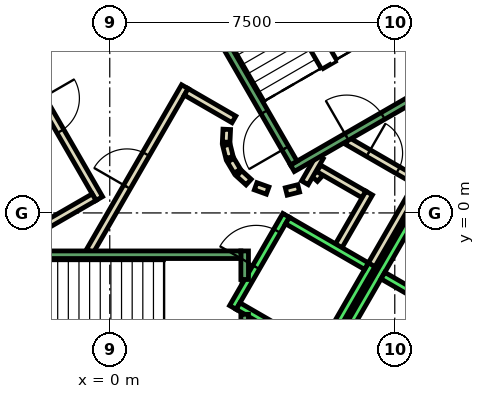
"""IFC4 building model, lengths in metres.
Left out: names, types, materials, properties, quantities, classifications, styles, units other than length and angle.
Written with IfcOpenShell. Run it as: python <this file> out.ifc"""

import sys

from ifc_helpers import new_model, si_unit, direction, frame, frame_2d, origin, place, context, subcontext, project, spatial, rectangle, extrude, element, fill, save


model = new_model("IFC4")
c1 = context("Model", 3, precision=1e-05, world=origin(), true_north=direction((0.0, 1.0)))
c2 = subcontext(c1, "Body", "Model", "MODEL_VIEW")
j1 = project(units=[si_unit("LENGTHUNIT", "METRE"), si_unit("PLANEANGLEUNIT", "RADIAN")], contexts=[c1])
p1 = place(None, origin())
s1 = spatial("IfcSite", under=j1, at=p1, CompositionType="ELEMENT")
p2 = place(p1, origin())
s2 = spatial("IfcBuilding", under=s1, at=p2, CompositionType="ELEMENT")
p3 = place(p2, frame((0.0, 0.0, 159.2)))
s3 = spatial("IfcBuildingStorey", under=s2, at=p3, CompositionType="ELEMENT", Elevation=159.2)
p4 = place(p3, frame((5.39, 0.898, 0.0), z_axis=(0.0, 0.0, 1.0), x_axis=(0.673828488714, 0.738887791073, 0.0)))
e1 = element("IfcWall", 1, at=p4, inside=s3, PredefinedType="PARTITIONING", context=c2, shape_type="SweptSolid", body=[
    extrude(rectangle(XDim=0.263, YDim=0.2, at=frame_2d((0.131, 0.0))), origin(), (0.0, 0.0, 1.0), 3.8),
])
p5 = place(p3, frame((5.499, 1.172, 0.0), z_axis=(0.0, 0.0, 1.0), x_axis=(0.866333505267, -0.499465972466, 0.0)))
e2 = element("IfcWall", 2, at=p5, inside=s3, PredefinedType="PARTITIONING", context=c2, shape_type="SweptSolid", body=[
    extrude(rectangle(XDim=1.374, YDim=0.2, at=frame_2d((0.687, 0.0))), origin(), (0.0, 0.0, 1.0), 3.8),
])
p6 = place(p3, frame((6.826, 0.522, 0.0), z_axis=(0.0, 0.0, 1.0), x_axis=(-0.500016722714, -0.866015748706, 0.0)))
e3 = element("IfcWall", 3, at=p6, inside=s3, PredefinedType="PARTITIONING", context=c2, shape_type="SweptSolid", body=[
    extrude(rectangle(XDim=1.7, YDim=0.2, at=frame_2d((0.85, 0.0))), origin(), (0.0, 0.0, 1.0), 3.8),
])
p7 = place(p3, frame((6.25, 1.894, 0.0), z_axis=(0.0, 0.0, 1.0), x_axis=(0.866043184279, -0.499969202016, 0.0)))
e4 = element("IfcWall", 4, at=p7, inside=s3, PredefinedType="PARTITIONING", context=c2, shape_type="SweptSolid", body=[
    extrude(rectangle(XDim=2.084, YDim=0.2, at=frame_2d((1.042, 0.0))), origin(), (0.0, 0.0, 1.0), 3.8),
])
p8 = place(p7, frame((0.642, 0.0, 0.0)))
e5 = element("IfcOpeningElement", 5, at=p8, cuts=e4, PredefinedType="OPENING", context=c2, shape_type="SweptSolid", body=[
    extrude(rectangle(XDim=0.9, YDim=2.1, at=frame_2d((0.45, 1.05))), frame((0.0, 0.11, 0.0), z_axis=(0.0, -1.0, 0.0), x_axis=(1.0, 0.0, 0.0)), (0.0, 0.0, 1.0), 0.22),
])
p9 = place(p3, frame((8.192, 0.888, 0.0), z_axis=(0.0, 0.0, 1.0), x_axis=(-0.499940625693, -0.866059680843, 0.0)))
e6 = element("IfcWall", 6, at=p9, inside=s3, PredefinedType="PARTITIONING", context=c2, shape_type="SweptSolid", body=[
    extrude(rectangle(XDim=2.68, YDim=0.2, at=frame_2d((1.34, 0.0))), origin(), (0.0, 0.0, 1.0), 3.8),
])
p10 = place(p3, frame((5.135, 0.793, 0.0), z_axis=(0.0, 0.0, 1.0), x_axis=(0.499526442893, 0.866298639529, 0.0)))
e7 = element("IfcWall", 7, at=p10, inside=s3, PredefinedType="PARTITIONING", context=c2, shape_type="SweptSolid", body=[
    extrude(rectangle(XDim=0.791, YDim=0.2, at=frame_2d((0.396, 0.0))), origin(), (0.0, 0.0, 1.0), 3.8),
])
p11 = place(p3, frame((-0.52, -1.0, 0.0), z_axis=(0.0, 0.0, 1.0), x_axis=(0.50011622646, 0.865958290007, 0.0)))
e8 = element("IfcWall", 8, at=p11, inside=s3, PredefinedType="PARTITIONING", context=c2, shape_type="SweptSolid", body=[
    extrude(rectangle(XDim=4.991, YDim=0.2, at=frame_2d((2.496, 0.0))), origin(), (0.0, 0.0, 1.0), 3.8),
])
p12 = place(p11, frame((1.945, 0.0, 0.0)))
e9 = element("IfcOpeningElement", 9, at=p12, cuts=e8, PredefinedType="OPENING", context=c2, shape_type="SweptSolid", body=[
    extrude(rectangle(XDim=1.0, YDim=2.1, at=frame_2d((0.5, 1.05))), frame((0.0, 0.11, 0.0), z_axis=(0.0, -1.0, 0.0), x_axis=(1.0, 0.0, 0.0)), (0.0, 0.0, 1.0), 0.22),
])
p13 = place(p3, frame((2.012, 3.186, 0.0), z_axis=(0.0, 0.0, 1.0), x_axis=(0.865891012941, -0.500232699559, 0.0)))
e10 = element("IfcWall", 10, at=p13, inside=s3, PredefinedType="PARTITIONING", context=c2, shape_type="SweptSolid", body=[
    extrude(rectangle(XDim=1.449, YDim=0.2, at=frame_2d((0.725, 0.0))), origin(), (0.0, 0.0, 1.0), 3.8),
])
p14 = place(p3, frame((3.079, 2.199, 0.0), z_axis=(0.0, 0.0, 1.0), x_axis=(-0.047771483479, -0.998858290933, 0.0)))
e11 = element("IfcWall", 11, at=p14, inside=s3, PredefinedType="PARTITIONING", context=c2, shape_type="SweptSolid", body=[
    extrude(rectangle(XDim=0.337, YDim=0.2, at=frame_2d((0.169, 0.0))), origin(), (0.0, 0.0, 1.0), 3.8),
])
p15 = place(p3, frame((3.07, 1.786, 0.0), z_axis=(0.0, 0.0, 1.0), x_axis=(0.242705583207, -0.970099994784, 0.0)))
e12 = element("IfcWall", 12, at=p15, inside=s3, PredefinedType="PARTITIONING", context=c2, shape_type="SweptSolid", body=[
    extrude(rectangle(XDim=0.338, YDim=0.2, at=frame_2d((0.169, 0.0))), origin(), (0.0, 0.0, 1.0), 3.8),
])
for number, where, z_axis, x_axis in (
    (13, (3.182, 1.388, 0.0), (0.0, 0.0, 1.0), (0.512, -0.859, 0.0)),
    (14, (3.404, 1.039, 0.0), (0.0, 0.0, 1.0), (0.74, -0.672, 0.0)),
):
    element("IfcWall", number, at=place(p3, frame(where, z_axis=z_axis, x_axis=x_axis)), inside=s3, PredefinedType="PARTITIONING", context=c2, shape_type="SweptSolid", body=[
        extrude(rectangle(XDim=0.338, YDim=0.2, at=frame_2d((0.169, 0.0))), origin(), (0.0, 0.0, 1.0), 3.8),
    ])
p16 = place(p3, frame((3.838, 0.702, 0.0), z_axis=(0.0, 0.0, 1.0), x_axis=(0.941035081519, -0.338308993895, 0.0)))
e15 = element("IfcWall", 15, at=p16, inside=s3, PredefinedType="PARTITIONING", context=c2, shape_type="SweptSolid", body=[
    extrude(rectangle(XDim=0.337, YDim=0.2, at=frame_2d((0.168, 0.0))), origin(), (0.0, 0.0, 1.0), 3.8),
])
p17 = place(p3, frame((4.644, 0.564, 0.0), z_axis=(0.0, 0.0, 1.0), x_axis=(0.969929076366, 0.243387729394, 0.0)))
e16 = element("IfcWall", 16, at=p17, inside=s3, PredefinedType="PARTITIONING", context=c2, shape_type="SweptSolid", body=[
    extrude(rectangle(XDim=0.337, YDim=0.2, at=frame_2d((0.168, 0.0))), origin(), (0.0, 0.0, 1.0), 3.8),
])
p18 = place(p3, frame((-2.771, 4.7, 0.0), z_axis=(0.0, 0.0, 1.0), x_axis=(0.499969479948, -0.866043023828, 0.0)))
e17 = element("IfcWall", 17, at=p18, inside=s3, PredefinedType="PARTITIONING", context=c2, shape_type="SweptSolid", body=[
    extrude(rectangle(XDim=4.99, YDim=0.2, at=frame_2d((2.495, 0.0))), origin(), (0.0, 0.0, 1.0), 3.8),
])
p19 = place(p18, frame((1.945, 0.0, 0.0)))
e18 = element("IfcOpeningElement", 18, at=p19, cuts=e17, PredefinedType="OPENING", context=c2, shape_type="SweptSolid", body=[
    extrude(rectangle(XDim=1.0, YDim=2.1, at=frame_2d((0.5, 1.05))), frame((0.0, 0.11, 0.0), z_axis=(0.0, -1.0, 0.0), x_axis=(1.0, 0.0, 0.0)), (0.0, 0.0, 1.0), 0.22),
])
p20 = place(p3, frame((-0.412, 0.414, 0.0), z_axis=(0.0, 0.0, 1.0), x_axis=(-0.866017369001, -0.500013916395, 0.0)))
e19 = element("IfcWall", 19, at=p20, inside=s3, PredefinedType="PARTITIONING", context=c2, shape_type="SweptSolid", body=[
    extrude(rectangle(XDim=1.45, YDim=0.2, at=frame_2d((0.725, 0.0))), origin(), (0.0, 0.0, 1.0), 3.8),
])
p21 = place(p3, frame((3.24, -2.488, 0.0), z_axis=(0.0, 0.0, 1.0), x_axis=(0.49994636267, 0.866056369097, 0.0)))
e20 = element("IfcWall", 20, at=p21, inside=s3, PredefinedType="STANDARD", context=c2, shape_type="SweptSolid", body=[
    extrude(rectangle(XDim=2.8, YDim=0.2, at=frame_2d((1.4, 0.0))), origin(), (0.0, 0.0, 1.0), 3.8),
])
p22 = place(p21, frame((1.225, 0.0, 0.0)))
e21 = element("IfcOpeningElement", 21, at=p22, cuts=e20, PredefinedType="OPENING", context=c2, shape_type="SweptSolid", body=[
    extrude(rectangle(XDim=1.1, YDim=2.1, at=frame_2d((0.55, 1.05))), frame((0.0, 0.11, 0.0), z_axis=(0.0, -1.0, 0.0), x_axis=(1.0, 0.0, 0.0)), (0.0, 0.0, 1.0), 0.22),
])
p23 = place(p3, frame((5.492, -3.788, 0.0), z_axis=(0.0, 0.0, 1.0), x_axis=(0.500011755427, 0.866018616679, 0.0)))
e22 = element("IfcWall", 22, at=p23, inside=s3, PredefinedType="STANDARD", context=c2, shape_type="SweptSolid", body=[
    extrude(rectangle(XDim=2.8, YDim=0.2, at=frame_2d((1.4, 0.0))), origin(), (0.0, 0.0, 1.0), 3.8),
])
p24 = place(p3, frame((3.377, -2.452, 0.0), z_axis=(0.0, 0.0, 1.0), x_axis=(0.865955154139, -0.50012165622, 0.0)))
e23 = element("IfcWall", 23, at=p24, inside=s3, PredefinedType="STANDARD", context=c2, shape_type="SweptSolid", body=[
    extrude(rectangle(XDim=2.4, YDim=0.2, at=frame_2d((1.2, 0.0))), origin(), (0.0, 0.0, 1.0), 3.8),
])
p25 = place(p3, frame((4.677, -0.2, 0.0), z_axis=(0.0, 0.0, 1.0), x_axis=(0.865973769406, -0.500089422704, 0.0)))
e24 = element("IfcWall", 24, at=p25, inside=s3, PredefinedType="STANDARD", context=c2, shape_type="SweptSolid", body=[
    extrude(rectangle(XDim=2.399, YDim=0.2, at=frame_2d((1.2, 0.0))), origin(), (0.0, 0.0, 1.0), 3.8),
])
p26 = place(p3, frame((4.451, -6.19, 0.0), z_axis=(0.0, 0.0, 1.0), x_axis=(0.50000090737, 0.866024879913, 0.0)))
e25 = element("IfcWall", 25, at=p26, inside=s3, PredefinedType="STANDARD", context=c2, shape_type="SweptSolid", body=[
    extrude(rectangle(XDim=10.6, YDim=0.2, at=frame_2d((5.3, 0.0))), origin(), (0.0, 0.0, 1.0), 3.8),
])
p27 = place(p3, frame((7.188, -1.65, 0.0), z_axis=(0.0, 0.0, 1.0), x_axis=(0.866022959057, -0.500004234368, 0.0)))
e26 = element("IfcWall", 26, at=p27, inside=s3, PredefinedType="STANDARD", context=c2, shape_type="SweptSolid", body=[
    extrude(rectangle(XDim=2.5, YDim=0.2, at=frame_2d((1.25, 0.0))), origin(), (0.0, 0.0, 1.0), 3.8),
])
p28 = place(p3, frame((3.55, -2.667, 0.0), z_axis=(0.0, 0.0, 1.0), x_axis=(0.0, -1.0, 0.0)))
e27 = element("IfcWall", 27, at=p28, inside=s3, PredefinedType="STANDARD", context=c2, shape_type="SweptSolid", body=[
    extrude(rectangle(XDim=2.733, YDim=0.2, at=frame_2d((1.366, 0.0))), origin(), (0.0, 0.0, 1.0), 3.8),
])
p29 = place(p3, frame((3.55, -1.0, 0.0), z_axis=(0.0, 0.0, 1.0), x_axis=(0.0, -1.0, 0.0)))
e28 = element("IfcWall", 28, at=p29, inside=s3, PredefinedType="STANDARD", context=c2, shape_type="SweptSolid", body=[
    extrude(rectangle(XDim=0.751, YDim=0.2, at=frame_2d((0.375, 0.0))), origin(), (0.0, 0.0, 1.0), 3.8),
])
p30 = place(p3, frame((-3.45, -1.1, 0.0), z_axis=(0.0, 0.0, 1.0), x_axis=(1.0, 0.0, 0.0)))
e29 = element("IfcWall", 29, at=p30, inside=s3, PredefinedType="STANDARD", context=c2, shape_type="SweptSolid", body=[
    extrude(rectangle(XDim=6.9, YDim=0.2, at=frame_2d((3.45, 0.0))), origin(), (0.0, 0.0, 1.0), 3.8),
])
p31 = place(p30, frame((0.45, 0.0, 0.0)))
e30 = element("IfcOpeningElement", 30, at=p31, cuts=e29, PredefinedType="OPENING", context=c2, shape_type="SweptSolid", body=[
    extrude(rectangle(XDim=1.1, YDim=2.2, at=frame_2d((0.55, 1.1))), frame((0.0, 0.11, 0.0), z_axis=(0.0, -1.0, 0.0), x_axis=(1.0, 0.0, 0.0)), (0.0, 0.0, 1.0), 0.22),
])
p32 = place(p3, frame((4.806, 1.176, 0.0), z_axis=(0.0, 0.0, 1.0), x_axis=(0.866059941101, 0.499940174841, 0.0)))
e31 = element("IfcWall", 31, at=p32, inside=s3, PredefinedType="STANDARD", context=c2, shape_type="SweptSolid", body=[
    extrude(rectangle(XDim=4.4, YDim=0.2, at=frame_2d((2.2, 0.0))), origin(), (0.0, 0.0, 1.0), 3.8),
])
p33 = place(p32, frame((1.65, 0.0, 0.0)))
e32 = element("IfcOpeningElement", 32, at=p33, cuts=e31, PredefinedType="OPENING", context=c2, shape_type="SweptSolid", body=[
    extrude(rectangle(XDim=1.1, YDim=2.2, at=frame_2d((0.55, 1.1))), frame((0.0, 0.11, 0.0), z_axis=(0.0, -1.0, 0.0), x_axis=(1.0, 0.0, 0.0)), (0.0, 0.0, 1.0), 0.22),
])
p34 = place(p3, frame((4.843, 1.312, 0.0), z_axis=(0.0, 0.0, 1.0), x_axis=(-0.499963383562, 0.866046543262, 0.0)))
e33 = element("IfcWall", 33, at=p34, inside=s3, PredefinedType="STANDARD", context=c2, shape_type="SweptSolid", body=[
    extrude(rectangle(XDim=6.9, YDim=0.2, at=frame_2d((3.45, 0.0))), origin(), (0.0, 0.0, 1.0), 3.8),
])
p35 = place(p34, frame((0.45, 0.0, 0.0)))
e34 = element("IfcOpeningElement", 34, at=p35, cuts=e33, PredefinedType="OPENING", context=c2, shape_type="SweptSolid", body=[
    extrude(rectangle(XDim=1.1, YDim=2.2, at=frame_2d((0.55, 1.1))), frame((0.0, 0.11, 0.0), z_axis=(0.0, -1.0, 0.0), x_axis=(1.0, 0.0, 0.0)), (0.0, 0.0, 1.0), 0.22),
])
p36 = place(p3, frame((8.48, 3.412, 0.0), z_axis=(0.0, 0.0, 1.0), x_axis=(-0.499978703459, 0.866037698999, 0.0)))
e35 = element("IfcWall", 35, at=p36, inside=s3, PredefinedType="STANDARD", context=c2, shape_type="SweptSolid", body=[
    extrude(rectangle(XDim=6.9, YDim=0.2, at=frame_2d((3.45, 0.0))), origin(), (0.0, 0.0, 1.0), 3.8),
])
p37 = place(p3, frame((-1.393, 7.288, 0.0), z_axis=(0.0, 0.0, 1.0), x_axis=(-0.499963383562, -0.866046543262, 0.0)))
e36 = element("IfcWall", 36, at=p37, inside=s3, PredefinedType="STANDARD", context=c2, shape_type="SweptSolid", body=[
    extrude(rectangle(XDim=6.9, YDim=0.2, at=frame_2d((3.45, 0.0))), origin(), (0.0, 0.0, 1.0), 3.8),
])
p38 = place(p37, frame((0.45, 0.0, 0.0)))
e37 = element("IfcOpeningElement", 37, at=p38, cuts=e36, PredefinedType="OPENING", context=c2, shape_type="SweptSolid", body=[
    extrude(rectangle(XDim=1.1, YDim=2.2, at=frame_2d((0.55, 1.1))), frame((0.0, 0.11, 0.0), z_axis=(0.0, -1.0, 0.0), x_axis=(1.0, 0.0, 0.0)), (0.0, 0.0, 1.0), 0.22),
])
p39 = place(p12, origin())
e38 = element("IfcDoor", 38, at=p39, inside=s3, OperationType="SINGLE_SWING_LEFT", PredefinedType="DOOR", context=c2, shape_type="SweptSolid", body=[
    extrude(rectangle(XDim=1.0, YDim=2.1, at=frame_2d((0.5, 1.05))), frame((0.0, 0.025, 0.0), z_axis=(0.0, -1.0, 0.0), x_axis=(1.0, 0.0, 0.0)), (0.0, 0.0, 1.0), 0.05),
])
fill(e9, e38)
p40 = place(p19, origin())
e39 = element("IfcDoor", 39, at=p40, inside=s3, OperationType="SINGLE_SWING_RIGHT", PredefinedType="DOOR", context=c2, shape_type="SweptSolid", body=[
    extrude(rectangle(XDim=1.0, YDim=2.1, at=frame_2d((0.5, 1.05))), frame((0.0, 0.025, 0.0), z_axis=(0.0, -1.0, 0.0), x_axis=(1.0, 0.0, 0.0)), (0.0, 0.0, 1.0), 0.05),
])
fill(e18, e39)
p41 = place(p8, origin())
e40 = element("IfcDoor", 40, at=p41, inside=s3, OperationType="SINGLE_SWING_LEFT", PredefinedType="DOOR", context=c2, shape_type="SweptSolid", body=[
    extrude(rectangle(XDim=0.9, YDim=2.1, at=frame_2d((0.45, 1.05))), frame((0.0, 0.025, 0.0), z_axis=(0.0, -1.0, 0.0), x_axis=(1.0, 0.0, 0.0)), (0.0, 0.0, 1.0), 0.05),
])
fill(e5, e40)
p42 = place(p22, origin())
e41 = element("IfcDoor", 41, at=p42, inside=s3, OperationType="SLIDING_TO_LEFT", PredefinedType="DOOR", context=c2, shape_type="SweptSolid", body=[
    extrude(rectangle(XDim=1.1, YDim=2.1, at=frame_2d((0.55, 1.05))), frame((0.0, 0.025, 0.0), z_axis=(0.0, -1.0, 0.0), x_axis=(1.0, 0.0, 0.0)), (0.0, 0.0, 1.0), 0.05),
])
fill(e21, e41)
p43 = place(p35, origin())
e42 = element("IfcDoor", 42, at=p43, inside=s3, OperationType="SINGLE_SWING_LEFT", PredefinedType="DOOR", context=c2, shape_type="SweptSolid", body=[
    extrude(rectangle(XDim=1.1, YDim=2.2, at=frame_2d((0.55, 1.1))), frame((0.0, 0.025, 0.0), z_axis=(0.0, -1.0, 0.0), x_axis=(1.0, 0.0, 0.0)), (0.0, 0.0, 1.0), 0.05),
])
fill(e34, e42)
p44 = place(p33, origin())
e43 = element("IfcDoor", 43, at=p44, inside=s3, OperationType="SINGLE_SWING_LEFT", PredefinedType="DOOR", context=c2, shape_type="SweptSolid", body=[
    extrude(rectangle(XDim=1.1, YDim=2.2, at=frame_2d((0.55, 1.1))), frame((0.0, 0.025, 0.0), z_axis=(0.0, -1.0, 0.0), x_axis=(1.0, 0.0, 0.0)), (0.0, 0.0, 1.0), 0.05),
])
fill(e32, e43)
save(model, sys.argv[1])
